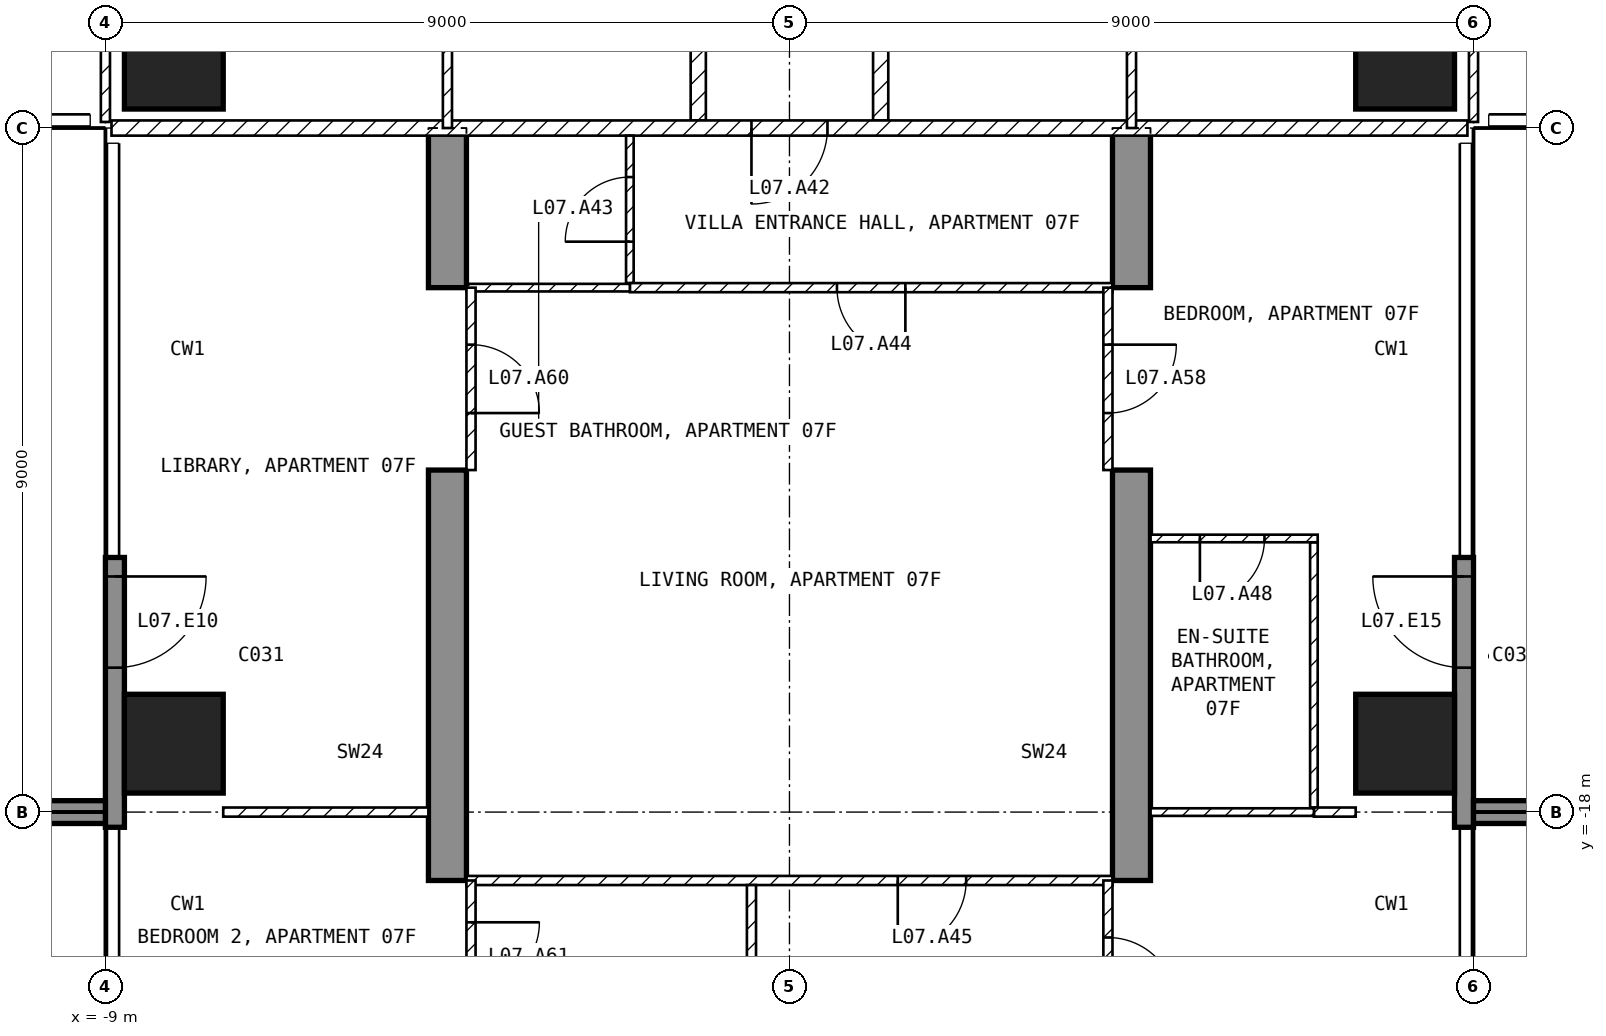
"""IFC4 building model, lengths in metres.
Left out: names, types, materials, properties, quantities, classifications, styles, units other than length and angle.
Written with IfcOpenShell. Run it as: python <this file> out.ifc"""

import sys

from ifc_helpers import new_model, si_unit, direction, frame, frame_2d, origin, origin_2d, place, context, subcontext, project, spatial, polyline, rectangle, outline, extrude, element, fill, save


model = new_model("IFC4")
c1 = context("Model", 3, precision=1e-05, world=origin(), true_north=direction((0.0, 1.0)))
c2 = subcontext(c1, "Body", "Model", "MODEL_VIEW")
j1 = project(units=[si_unit("LENGTHUNIT", "METRE"), si_unit("PLANEANGLEUNIT", "RADIAN")], contexts=[c1])
p1 = place(None, origin())
s1 = spatial("IfcSite", under=j1, at=p1, CompositionType="ELEMENT")
p2 = place(p1, origin())
s2 = spatial("IfcBuilding", under=s1, at=p2, CompositionType="ELEMENT")
p3 = place(p2, frame((0.0, 0.0, 43.5)))
s3 = spatial("IfcBuildingStorey", under=s2, at=p3, CompositionType="ELEMENT", Elevation=43.5)
for number, where, z_axis, x_axis in (
    (1, (-8.1, -17.1, -0.25), (0.0, 0.0, 1.0), (1.0, 0.0, 0.0)),
    (2, (-8.1, -8.1, -0.25), (0.0, 0.0, 1.0), (1.0, 0.0, 0.0)),
    (3, (8.1, -17.1, -0.25), (0.0, 0.0, 1.0), (1.0, 0.0, 0.0)),
    (4, (8.1, -8.1, -0.25), (0.0, 0.0, 1.0), (1.0, 0.0, 0.0)),
):
    element("IfcColumn", number, at=place(p3, frame(where, z_axis=z_axis, x_axis=x_axis)), inside=s3, PredefinedType="COLUMN", context=c2, shape_type="SweptSolid", body=[
        extrude(rectangle(XDim=1.3, YDim=1.3, at=origin_2d()), origin(), (0.0, 0.0, 1.0), 3.5),
    ])
for number, where, z_axis, x_axis in (
    (5, (-4.75, -25.45, -0.25), (1.0, 0.0, 0.0), (0.0, 1.0, 0.0)),
    (6, (4.25, -25.45, -0.25), (1.0, 0.0, 0.0), (0.0, 1.0, 0.0)),
):
    element("IfcWall", number, at=place(p3, frame(where, z_axis=z_axis, x_axis=x_axis)), inside=s3, PredefinedType="SHEAR", context=c2, shape_type="SweptSolid", body=[
        extrude(outline(polyline([(0.0, 0.0), (4.15, 0.0), (4.15, 2.65), (6.55, 2.65), (6.55, 0.0), (11.95, 0.0), (11.95, 2.65), (14.35, 2.65), (14.35, 0.0), (16.45, 0.0), (16.45, 3.5), (0.0, 3.5), (0.0, 0.0)])), origin(), (0.0, 0.0, 1.0), 0.5),
    ])
p4 = place(p3, frame((-8.875, -14.65, 0.0), z_axis=(0.0, 0.0, 1.0), x_axis=(0.0, -1.0, 0.0)))
e7 = element("IfcWall", 7, at=p4, inside=s3, PredefinedType="SOLIDWALL", context=c2, shape_type="SweptSolid", body=[
    extrude(rectangle(XDim=3.55, YDim=0.25, at=frame_2d((1.775, 0.0))), origin(), (0.0, 0.0, 1.0), 3.25),
])
p5 = place(p4, frame((0.25, 0.0, 0.0)))
e8 = element("IfcOpeningElement", 8, at=p5, cuts=e7, PredefinedType="OPENING", context=c2, shape_type="SweptSolid", body=[
    extrude(rectangle(XDim=1.2, YDim=2.4, at=frame_2d((0.6, 1.2))), frame((0.0, 0.135, 0.0), z_axis=(0.0, -1.0, 0.0), x_axis=(1.0, 0.0, 0.0)), (0.0, 0.0, 1.0), 0.27),
])
p6 = place(p3, frame((8.875, -18.2, 0.0), z_axis=(0.0, 0.0, 1.0), x_axis=(0.0, 1.0, 0.0)))
e9 = element("IfcWall", 9, at=p6, inside=s3, PredefinedType="SOLIDWALL", context=c2, shape_type="SweptSolid", body=[
    extrude(rectangle(XDim=3.55, YDim=0.25, at=frame_2d((1.775, 0.0))), origin(), (0.0, 0.0, 1.0), 3.25),
])
p7 = place(p6, frame((2.1, 0.0, 0.0)))
e10 = element("IfcOpeningElement", 10, at=p7, cuts=e9, PredefinedType="OPENING", context=c2, shape_type="SweptSolid", body=[
    extrude(rectangle(XDim=1.2, YDim=2.4, at=frame_2d((0.6, 1.2))), frame((0.0, 0.135, 0.0), z_axis=(0.0, -1.0, 0.0), x_axis=(1.0, 0.0, 0.0)), (0.0, 0.0, 1.0), 0.27),
])
for number, where, z_axis, x_axis in (
    (11, (-9.0, -18.0, 0.0), (0.0, 0.0, 1.0), (-1.0, 0.0, 0.0)),
    (12, (9.0, -18.0, 0.0), (0.0, 0.0, 1.0), (1.0, 0.0, 0.0)),
):
    element("IfcWall", number, at=place(p3, frame(where, z_axis=z_axis, x_axis=x_axis)), inside=s3, PredefinedType="SOLIDWALL", context=c2, shape_type="SweptSolid", body=[
        extrude(rectangle(XDim=2.7, YDim=0.3, at=frame_2d((1.35, 0.0))), origin(), (0.0, 0.0, 1.0), 3.25),
    ])
for number, where, z_axis, x_axis in (
    (13, (1.2, -1.3, 0.0), (0.0, 0.0, 1.0), (0.0, -1.0, 0.0)),
    (14, (-1.2, -8.9, 0.0), (0.0, 0.0, 1.0), (0.0, 1.0, 0.0)),
):
    element("IfcWall", number, at=place(p3, frame(where, z_axis=z_axis, x_axis=x_axis)), inside=s3, PredefinedType="PARTITIONING", context=c2, shape_type="SweptSolid", body=[
        extrude(rectangle(XDim=7.6, YDim=0.2, at=frame_2d((3.8, 0.0))), origin(), (0.0, 0.0, 1.0), 3.25),
    ])
p8 = place(p3, frame((8.92, -9.0, 0.0), z_axis=(0.0, 0.0, 1.0), x_axis=(-1.0, 0.0, 0.0)))
e15 = element("IfcWall", 15, at=p8, inside=s3, PredefinedType="PARTITIONING", context=c2, shape_type="SweptSolid", body=[
    extrude(rectangle(XDim=17.84, YDim=0.2, at=frame_2d((8.92, 0.0))), origin(), (0.0, 0.0, 1.0), 3.25),
])
p9 = place(p8, frame((8.42, 0.0, 0.0)))
e16 = element("IfcOpeningElement", 16, at=p9, cuts=e15, PredefinedType="OPENING", context=c2, shape_type="SweptSolid", body=[
    extrude(rectangle(XDim=1.0, YDim=2.1, at=frame_2d((0.5, 1.05))), frame((0.0, 0.11, 0.0), z_axis=(0.0, -1.0, 0.0), x_axis=(1.0, 0.0, 0.0)), (0.0, 0.0, 1.0), 0.22),
])
p10 = place(p3, frame((9.0, -8.92, 0.0), z_axis=(0.0, 0.0, 1.0), x_axis=(0.0, 1.0, 0.0)))
e17 = element("IfcWall", 17, at=p10, inside=s3, PredefinedType="PARTITIONING", context=c2, shape_type="SweptSolid", body=[
    extrude(rectangle(XDim=7.62, YDim=0.12, at=frame_2d((3.81, 0.0))), origin(), (0.0, 0.0, 1.0), 3.25),
])
p11 = place(p10, frame((2.67, 0.0, 0.0)))
e18 = element("IfcOpeningElement", 18, at=p11, cuts=e17, PredefinedType="OPENING", context=c2, shape_type="SweptSolid", body=[
    extrude(rectangle(XDim=0.9, YDim=2.1, at=frame_2d((0.45, 1.05))), frame((0.0, 0.07, 0.0), z_axis=(0.0, -1.0, 0.0), x_axis=(1.0, 0.0, 0.0)), (0.0, 0.0, 1.0), 0.14),
])
p12 = place(p3, frame((4.5, -9.0, 0.0), z_axis=(0.0, 0.0, 1.0), x_axis=(0.0, 1.0, 0.0)))
e19 = element("IfcWall", 19, at=p12, inside=s3, PredefinedType="PARTITIONING", context=c2, shape_type="SweptSolid", body=[
    extrude(rectangle(XDim=4.68, YDim=0.12, at=frame_2d((2.34, 0.0))), origin(), (0.0, 0.0, 1.0), 3.25),
])
p13 = place(p12, frame((1.89, 0.0, 0.0)))
e20 = element("IfcOpeningElement", 20, at=p13, cuts=e19, PredefinedType="OPENING", context=c2, shape_type="SweptSolid", body=[
    extrude(rectangle(XDim=0.9, YDim=2.1, at=frame_2d((0.45, 1.05))), frame((0.0, 0.07, 0.0), z_axis=(0.0, -1.0, 0.0), x_axis=(1.0, 0.0, 0.0)), (0.0, 0.0, 1.0), 0.14),
])
p14 = place(p3, frame((-9.0, -1.3, 0.0), z_axis=(0.0, 0.0, 1.0), x_axis=(0.0, -1.0, 0.0)))
e21 = element("IfcWall", 21, at=p14, inside=s3, PredefinedType="PARTITIONING", context=c2, shape_type="SweptSolid", body=[
    extrude(rectangle(XDim=7.62, YDim=0.12, at=frame_2d((3.81, 0.0))), origin(), (0.0, 0.0, 1.0), 3.25),
])
p15 = place(p14, frame((1.15, 0.0, 0.0)))
e22 = element("IfcOpeningElement", 22, at=p15, cuts=e21, PredefinedType="OPENING", context=c2, shape_type="SweptSolid", body=[
    extrude(rectangle(XDim=0.9, YDim=2.1, at=frame_2d((0.45, 1.05))), frame((0.0, 0.07, 0.0), z_axis=(0.0, -1.0, 0.0), x_axis=(1.0, 0.0, 0.0)), (0.0, 0.0, 1.0), 0.14),
])
p16 = place(p3, frame((-4.5, -4.32, 0.0), z_axis=(0.0, 0.0, 1.0), x_axis=(0.0, -1.0, 0.0)))
e23 = element("IfcWall", 23, at=p16, inside=s3, PredefinedType="PARTITIONING", context=c2, shape_type="SweptSolid", body=[
    extrude(rectangle(XDim=4.68, YDim=0.12, at=frame_2d((2.34, 0.0))), origin(), (0.0, 0.0, 1.0), 3.25),
])
p17 = place(p16, frame((1.89, 0.0, 0.0)))
e24 = element("IfcOpeningElement", 24, at=p17, cuts=e23, PredefinedType="OPENING", context=c2, shape_type="SweptSolid", body=[
    extrude(rectangle(XDim=0.9, YDim=2.1, at=frame_2d((0.45, 1.05))), frame((0.0, 0.07, 0.0), z_axis=(0.0, -1.0, 0.0), x_axis=(1.0, 0.0, 0.0)), (0.0, 0.0, 1.0), 0.14),
])
p18 = place(p3, frame((-2.1, -11.04, 0.0), z_axis=(0.0, 0.0, 1.0), x_axis=(0.0, 1.0, 0.0)))
e25 = element("IfcWall", 25, at=p18, inside=s3, PredefinedType="PARTITIONING", context=c2, shape_type="SweptSolid", body=[
    extrude(rectangle(XDim=1.94, YDim=0.1, at=frame_2d((0.97, 0.0))), origin(), (0.0, 0.0, 1.0), 3.25),
])
p19 = place(p18, frame((0.545, 0.0, 0.0)))
e26 = element("IfcOpeningElement", 26, at=p19, cuts=e25, PredefinedType="OPENING", context=c2, shape_type="SweptSolid", body=[
    extrude(rectangle(XDim=0.85, YDim=2.1, at=frame_2d((0.425, 1.05))), frame((0.0, 0.06, 0.0), z_axis=(0.0, -1.0, 0.0), x_axis=(1.0, 0.0, 0.0)), (0.0, 0.0, 1.0), 0.12),
])
p20 = place(p3, frame((4.25, -11.1, 0.0), z_axis=(0.0, 0.0, 1.0), x_axis=(-1.0, 0.0, 0.0)))
e27 = element("IfcWall", 27, at=p20, inside=s3, PredefinedType="PARTITIONING", context=c2, shape_type="SweptSolid", body=[
    extrude(rectangle(XDim=6.35, YDim=0.12, at=frame_2d((3.175, 0.0))), origin(), (0.0, 0.0, 1.0), 3.25),
])
p21 = place(p20, frame((2.725, 0.0, 0.0)))
e28 = element("IfcOpeningElement", 28, at=p21, cuts=e27, PredefinedType="OPENING", context=c2, shape_type="SweptSolid", body=[
    extrude(rectangle(XDim=0.9, YDim=2.1, at=frame_2d((0.45, 1.05))), frame((0.0, 0.07, 0.0), z_axis=(0.0, -1.0, 0.0), x_axis=(1.0, 0.0, 0.0)), (0.0, 0.0, 1.0), 0.14),
])
p22 = place(p3, frame((-2.1, -11.1, 0.0), z_axis=(0.0, 0.0, 1.0), x_axis=(-1.0, 0.0, 0.0)))
e29 = element("IfcWall", 29, at=p22, inside=s3, PredefinedType="PARTITIONING", context=c2, shape_type="SweptSolid", body=[
    extrude(rectangle(XDim=2.15, YDim=0.1, at=frame_2d((1.075, 0.0))), origin(), (0.0, 0.0, 1.0), 3.25),
])
p23 = place(p3, frame((4.25, -18.9, 0.0), z_axis=(0.0, 0.0, 1.0), x_axis=(-1.0, 0.0, 0.0)))
e30 = element("IfcWall", 30, at=p23, inside=s3, PredefinedType="PARTITIONING", context=c2, shape_type="SweptSolid", body=[
    extrude(rectangle(XDim=8.5, YDim=0.12, at=frame_2d((4.25, 0.0))), origin(), (0.0, 0.0, 1.0), 3.25),
])
p24 = place(p23, frame((1.925, 0.0, 0.0)))
e31 = element("IfcOpeningElement", 31, at=p24, cuts=e30, PredefinedType="OPENING", context=c2, shape_type="SweptSolid", body=[
    extrude(rectangle(XDim=0.9, YDim=2.1, at=frame_2d((0.45, 1.05))), frame((0.0, 0.07, 0.0), z_axis=(0.0, -1.0, 0.0), x_axis=(1.0, 0.0, 0.0)), (0.0, 0.0, 1.0), 0.14),
])
p25 = place(p3, frame((-0.5, -23.34, 0.0), z_axis=(0.0, 0.0, 1.0), x_axis=(0.0, 1.0, 0.0)))
e32 = element("IfcWall", 32, at=p25, inside=s3, PredefinedType="PARTITIONING", context=c2, shape_type="SweptSolid", body=[
    extrude(rectangle(XDim=4.38, YDim=0.12, at=frame_2d((2.19, 0.0))), origin(), (0.0, 0.0, 1.0), 3.25),
])
p26 = place(p25, frame((1.74, 0.0, 0.0)))
e33 = element("IfcOpeningElement", 33, at=p26, cuts=e32, PredefinedType="OPENING", context=c2, shape_type="SweptSolid", body=[
    extrude(rectangle(XDim=0.9, YDim=2.1, at=frame_2d((0.45, 1.05))), frame((0.0, 0.07, 0.0), z_axis=(0.0, -1.0, 0.0), x_axis=(1.0, 0.0, 0.0)), (0.0, 0.0, 1.0), 0.14),
])
p27 = place(p3, frame((6.9, -17.94, 0.0), z_axis=(0.0, 0.0, 1.0), x_axis=(0.0, 1.0, 0.0)))
e34 = element("IfcWall", 34, at=p27, inside=s3, PredefinedType="PARTITIONING", context=c2, shape_type="SweptSolid", body=[
    extrude(rectangle(XDim=3.49, YDim=0.1, at=frame_2d((1.745, 0.0))), origin(), (0.0, 0.0, 1.0), 3.25),
])
p28 = place(p3, frame((6.95, -14.4, 0.0), z_axis=(0.0, 0.0, 1.0), x_axis=(-1.0, 0.0, 0.0)))
e35 = element("IfcWall", 35, at=p28, inside=s3, PredefinedType="PARTITIONING", context=c2, shape_type="SweptSolid", body=[
    extrude(rectangle(XDim=2.2, YDim=0.1, at=frame_2d((1.1, 0.0))), origin(), (0.0, 0.0, 1.0), 3.25),
])
p29 = place(p28, frame((0.7, 0.0, 0.0)))
e36 = element("IfcOpeningElement", 36, at=p29, cuts=e35, PredefinedType="OPENING", context=c2, shape_type="SweptSolid", body=[
    extrude(rectangle(XDim=0.85, YDim=2.1, at=frame_2d((0.425, 1.05))), frame((0.0, 0.06, 0.0), z_axis=(0.0, -1.0, 0.0), x_axis=(1.0, 0.0, 0.0)), (0.0, 0.0, 1.0), 0.12),
])
p30 = place(p3, frame((7.45, -18.0, 0.0), z_axis=(0.0, 0.0, 1.0), x_axis=(-1.0, 0.0, 0.0)))
e37 = element("IfcWall", 37, at=p30, inside=s3, PredefinedType="PARTITIONING", context=c2, shape_type="SweptSolid", body=[
    extrude(rectangle(XDim=0.55, YDim=0.12, at=frame_2d((0.275, 0.0))), origin(), (0.0, 0.0, 1.0), 3.25),
])
p31 = place(p3, frame((6.9, -18.0, 0.0), z_axis=(0.0, 0.0, 1.0), x_axis=(-1.0, 0.0, 0.0)))
e38 = element("IfcWall", 38, at=p31, inside=s3, PredefinedType="PARTITIONING", context=c2, shape_type="SweptSolid", body=[
    extrude(rectangle(XDim=2.15, YDim=0.1, at=frame_2d((1.075, 0.0))), origin(), (0.0, 0.0, 1.0), 3.25),
])
p32 = place(p3, frame((-4.75, -18.0, 0.0), z_axis=(0.0, 0.0, 1.0), x_axis=(-1.0, 0.0, 0.0)))
e39 = element("IfcWall", 39, at=p32, inside=s3, PredefinedType="PARTITIONING", context=c2, shape_type="SweptSolid", body=[
    extrude(rectangle(XDim=2.7, YDim=0.12, at=frame_2d((1.35, 0.0))), origin(), (0.0, 0.0, 1.0), 3.25),
])
p33 = place(p3, frame((4.19, -11.1, 0.0), z_axis=(0.0, 0.0, 1.0), x_axis=(0.0, -1.0, 0.0)))
e40 = element("IfcWall", 40, at=p33, inside=s3, PredefinedType="PARTITIONING", context=c2, shape_type="SweptSolid", body=[
    extrude(rectangle(XDim=2.4, YDim=0.12, at=frame_2d((1.2, 0.0))), origin(), (0.0, 0.0, 1.0), 2.4),
])
p34 = place(p33, frame((0.75, 0.0, 0.0)))
e41 = element("IfcOpeningElement", 41, at=p34, cuts=e40, PredefinedType="OPENING", context=c2, shape_type="SweptSolid", body=[
    extrude(rectangle(XDim=0.9, YDim=2.1, at=frame_2d((0.45, 1.05))), frame((0.0, 0.07, 0.0), z_axis=(0.0, -1.0, 0.0), x_axis=(1.0, 0.0, 0.0)), (0.0, 0.0, 1.0), 0.14),
])
p35 = place(p3, frame((4.19, -18.9, 0.0), z_axis=(0.0, 0.0, 1.0), x_axis=(0.0, -1.0, 0.0)))
e42 = element("IfcWall", 42, at=p35, inside=s3, PredefinedType="PARTITIONING", context=c2, shape_type="SweptSolid", body=[
    extrude(rectangle(XDim=2.4, YDim=0.12, at=frame_2d((1.2, 0.0))), origin(), (0.0, 0.0, 1.0), 2.4),
])
p36 = place(p35, frame((0.75, 0.0, 0.0)))
e43 = element("IfcOpeningElement", 43, at=p36, cuts=e42, PredefinedType="OPENING", context=c2, shape_type="SweptSolid", body=[
    extrude(rectangle(XDim=0.9, YDim=2.1, at=frame_2d((0.45, 1.05))), frame((0.0, 0.07, 0.0), z_axis=(0.0, -1.0, 0.0), x_axis=(1.0, 0.0, 0.0)), (0.0, 0.0, 1.0), 0.14),
])
p37 = place(p3, frame((-4.19, -11.1, 0.0), z_axis=(0.0, 0.0, 1.0), x_axis=(0.0, -1.0, 0.0)))
e44 = element("IfcWall", 44, at=p37, inside=s3, PredefinedType="PARTITIONING", context=c2, shape_type="SweptSolid", body=[
    extrude(rectangle(XDim=2.4, YDim=0.12, at=frame_2d((1.2, 0.0))), origin(), (0.0, 0.0, 1.0), 2.4),
])
p38 = place(p37, frame((0.75, 0.0, 0.0)))
e45 = element("IfcOpeningElement", 45, at=p38, cuts=e44, PredefinedType="OPENING", context=c2, shape_type="SweptSolid", body=[
    extrude(rectangle(XDim=0.9, YDim=2.1, at=frame_2d((0.45, 1.05))), frame((0.0, 0.07, 0.0), z_axis=(0.0, -1.0, 0.0), x_axis=(1.0, 0.0, 0.0)), (0.0, 0.0, 1.0), 0.14),
])
p39 = place(p3, frame((-4.19, -18.9, 0.0), z_axis=(0.0, 0.0, 1.0), x_axis=(0.0, -1.0, 0.0)))
e46 = element("IfcWall", 46, at=p39, inside=s3, PredefinedType="PARTITIONING", context=c2, shape_type="SweptSolid", body=[
    extrude(rectangle(XDim=2.4, YDim=0.12, at=frame_2d((1.2, 0.0))), origin(), (0.0, 0.0, 1.0), 2.4),
])
p40 = place(p39, frame((0.55, 0.0, 0.0)))
e47 = element("IfcOpeningElement", 47, at=p40, cuts=e46, PredefinedType="OPENING", context=c2, shape_type="SweptSolid", body=[
    extrude(rectangle(XDim=0.9, YDim=2.1, at=frame_2d((0.45, 1.05))), frame((0.0, 0.07, 0.0), z_axis=(0.0, -1.0, 0.0), x_axis=(1.0, 0.0, 0.0)), (0.0, 0.0, 1.0), 0.14),
])
p41 = place(p5, origin())
e48 = element("IfcDoor", 48, at=p41, inside=s3, OperationType="SINGLE_SWING_LEFT", PredefinedType="DOOR", context=c2, shape_type="SweptSolid", body=[
    extrude(rectangle(XDim=1.2, YDim=2.4, at=frame_2d((0.6, 1.2))), frame((0.0, 0.025, 0.0), z_axis=(0.0, -1.0, 0.0), x_axis=(1.0, 0.0, 0.0)), (0.0, 0.0, 1.0), 0.05),
])
fill(e8, e48)
p42 = place(p7, origin())
e49 = element("IfcDoor", 49, at=p42, inside=s3, OperationType="SINGLE_SWING_RIGHT", PredefinedType="DOOR", context=c2, shape_type="SweptSolid", body=[
    extrude(rectangle(XDim=1.2, YDim=2.4, at=frame_2d((0.6, 1.2))), frame((0.0, 0.025, 0.0), z_axis=(0.0, -1.0, 0.0), x_axis=(1.0, 0.0, 0.0)), (0.0, 0.0, 1.0), 0.05),
])
fill(e10, e49)
p43 = place(p9, origin())
e50 = element("IfcDoor", 50, at=p43, inside=s3, OperationType="SINGLE_SWING_RIGHT", PredefinedType="DOOR", context=c2, shape_type="SweptSolid", body=[
    extrude(rectangle(XDim=1.0, YDim=2.1, at=frame_2d((0.5, 1.05))), frame((0.0, 0.025, 0.0), z_axis=(0.0, -1.0, 0.0), x_axis=(1.0, 0.0, 0.0)), (0.0, 0.0, 1.0), 0.05),
])
fill(e16, e50)
p44 = place(p19, origin())
e51 = element("IfcDoor", 51, at=p44, inside=s3, OperationType="SINGLE_SWING_LEFT", PredefinedType="DOOR", context=c2, shape_type="SweptSolid", body=[
    extrude(rectangle(XDim=0.85, YDim=2.1, at=frame_2d((0.425, 1.05))), frame((0.0, 0.025, 0.0), z_axis=(0.0, -1.0, 0.0), x_axis=(1.0, 0.0, 0.0)), (0.0, 0.0, 1.0), 0.05),
])
fill(e26, e51)
p45 = place(p21, origin())
e52 = element("IfcDoor", 52, at=p45, inside=s3, OperationType="SINGLE_SWING_LEFT", PredefinedType="DOOR", context=c2, shape_type="SweptSolid", body=[
    extrude(rectangle(XDim=0.9, YDim=2.1, at=frame_2d((0.45, 1.05))), frame((0.0, 0.025, 0.0), z_axis=(0.0, -1.0, 0.0), x_axis=(1.0, 0.0, 0.0)), (0.0, 0.0, 1.0), 0.05),
])
fill(e28, e52)
p46 = place(p24, origin())
e53 = element("IfcDoor", 53, at=p46, inside=s3, OperationType="SINGLE_SWING_RIGHT", PredefinedType="DOOR", context=c2, shape_type="SweptSolid", body=[
    extrude(rectangle(XDim=0.9, YDim=2.1, at=frame_2d((0.45, 1.05))), frame((0.0, 0.025, 0.0), z_axis=(0.0, -1.0, 0.0), x_axis=(1.0, 0.0, 0.0)), (0.0, 0.0, 1.0), 0.05),
])
fill(e31, e53)
p47 = place(p29, origin())
e54 = element("IfcDoor", 54, at=p47, inside=s3, OperationType="SINGLE_SWING_RIGHT", PredefinedType="DOOR", context=c2, shape_type="SweptSolid", body=[
    extrude(rectangle(XDim=0.85, YDim=2.1, at=frame_2d((0.425, 1.05))), frame((0.0, 0.025, 0.0), z_axis=(0.0, -1.0, 0.0), x_axis=(1.0, 0.0, 0.0)), (0.0, 0.0, 1.0), 0.05),
])
fill(e36, e54)
p48 = place(p34, origin())
e55 = element("IfcDoor", 55, at=p48, inside=s3, OperationType="SINGLE_SWING_LEFT", PredefinedType="DOOR", context=c2, shape_type="SweptSolid", body=[
    extrude(rectangle(XDim=0.9, YDim=2.1, at=frame_2d((0.45, 1.05))), frame((0.0, 0.025, 0.0), z_axis=(0.0, -1.0, 0.0), x_axis=(1.0, 0.0, 0.0)), (0.0, 0.0, 1.0), 0.05),
])
fill(e41, e55)
p49 = place(p36, origin())
e56 = element("IfcDoor", 56, at=p49, inside=s3, OperationType="SINGLE_SWING_RIGHT", PredefinedType="DOOR", context=c2, shape_type="SweptSolid", body=[
    extrude(rectangle(XDim=0.9, YDim=2.1, at=frame_2d((0.45, 1.05))), frame((0.0, 0.025, 0.0), z_axis=(0.0, -1.0, 0.0), x_axis=(1.0, 0.0, 0.0)), (0.0, 0.0, 1.0), 0.05),
])
fill(e43, e56)
p50 = place(p38, origin())
e57 = element("IfcDoor", 57, at=p50, inside=s3, OperationType="SINGLE_SWING_RIGHT", PredefinedType="DOOR", context=c2, shape_type="SweptSolid", body=[
    extrude(rectangle(XDim=0.9, YDim=2.1, at=frame_2d((0.45, 1.05))), frame((0.0, 0.025, 0.0), z_axis=(0.0, -1.0, 0.0), x_axis=(1.0, 0.0, 0.0)), (0.0, 0.0, 1.0), 0.05),
])
fill(e45, e57)
p51 = place(p40, origin())
e58 = element("IfcDoor", 58, at=p51, inside=s3, OperationType="SINGLE_SWING_LEFT", PredefinedType="DOOR", context=c2, shape_type="SweptSolid", body=[
    extrude(rectangle(XDim=0.9, YDim=2.1, at=frame_2d((0.45, 1.05))), frame((0.0, 0.025, 0.0), z_axis=(0.0, -1.0, 0.0), x_axis=(1.0, 0.0, 0.0)), (0.0, 0.0, 1.0), 0.05),
])
fill(e47, e58)
save(model, sys.argv[1])
